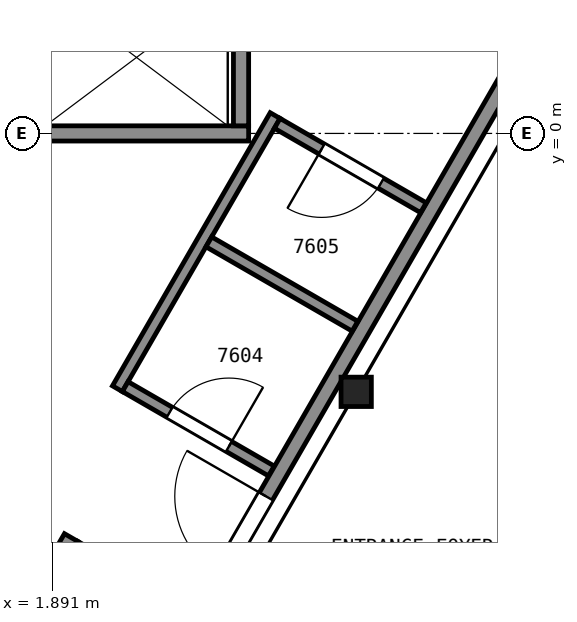
"""IFC4 building model, lengths in metres.
Left out: names, types, materials, properties, quantities, classifications, styles, units other than length and angle.
Written with IfcOpenShell. Run it as: python <this file> out.ifc"""

import sys

from ifc_helpers import new_model, si_unit, direction, frame, frame_2d, origin, origin_2d, place, context, subcontext, project, spatial, rectangle, i_section, extrude, element, fill, save


model = new_model("IFC4")
c1 = context("Model", 3, precision=1e-05, world=origin(), true_north=direction((0.0, 1.0)))
c2 = subcontext(c1, "Body", "Model", "MODEL_VIEW")
j1 = project(units=[si_unit("LENGTHUNIT", "METRE"), si_unit("PLANEANGLEUNIT", "RADIAN")], contexts=[c1])
p1 = place(None, origin())
s1 = spatial("IfcSite", under=j1, at=p1, CompositionType="ELEMENT")
p2 = place(p1, origin())
s2 = spatial("IfcBuilding", under=s1, at=p2, CompositionType="ELEMENT")
p3 = place(p2, frame((0.0, 0.0, 301.0)))
s3 = spatial("IfcBuildingStorey", under=s2, at=p3, CompositionType="ELEMENT", Elevation=301.0)
p4 = place(p3, frame((5.89, -3.4, 0.0), z_axis=(0.0, 0.0, 1.0), x_axis=(1.0, 0.0, 0.0)))
e1 = element("IfcColumn", 1, at=p4, inside=s3, PredefinedType="COLUMN", context=c2, shape_type="SweptSolid", body=[
    extrude(i_section(OverallWidth=0.399, OverallDepth=0.386, WebThickness=0.021, FlangeThickness=0.033, FilletRadius=0.015, at=origin_2d()), origin(), (0.0, 0.0, 1.0), 3.7),
])
p5 = place(p3, frame((1.525, 0.0, 0.0), z_axis=(0.0, 0.0, 1.0), x_axis=(1.0, 0.0, 0.0)))
e2 = element("IfcWall", 2, at=p5, inside=s3, PredefinedType="PARTITIONING", context=c2, shape_type="SweptSolid", body=[
    extrude(rectangle(XDim=2.95, YDim=0.2, at=frame_2d((1.475, 0.0))), origin(), (0.0, 0.0, 1.0), 3.7),
])
p6 = place(p3, frame((0.863, -7.525, 0.0), z_axis=(0.0, 0.0, 1.0), x_axis=(0.499990435942, 0.866030925526, 0.0)))
e3 = element("IfcWall", 3, at=p6, inside=s3, PredefinedType="PARTITIONING", context=c2, shape_type="SweptSolid", body=[
    extrude(rectangle(XDim=2.55, YDim=0.2, at=frame_2d((1.275, 0.0))), origin(), (0.0, 0.0, 1.0), 3.7),
])
p7 = place(p6, frame((0.725, 0.0, 0.0)))
e4 = element("IfcOpeningElement", 4, at=p7, cuts=e3, PredefinedType="OPENING", context=c2, shape_type="SweptSolid", body=[
    extrude(rectangle(XDim=1.1, YDim=2.1, at=frame_2d((0.55, 1.05))), frame((0.0, 0.11, 0.0), z_axis=(0.0, -1.0, 0.0), x_axis=(1.0, 0.0, 0.0)), (0.0, 0.0, 1.0), 0.22),
])
p8 = place(p3, frame((4.375, 0.1, 0.0), z_axis=(0.0, 0.0, 1.0), x_axis=(0.0, 1.0, 0.0)))
e5 = element("IfcWall", 5, at=p8, inside=s3, PredefinedType="PARTITIONING", context=c2, shape_type="SweptSolid", body=[
    extrude(rectangle(XDim=1.95, YDim=0.2, at=frame_2d((0.975, 0.0))), origin(), (0.0, 0.0, 1.0), 3.7),
])
p9 = place(p3, frame((3.69, -6.328, 0.0), z_axis=(0.0, 0.0, 1.0), x_axis=(-0.866036909293, 0.499980071345, 0.0)))
e6 = element("IfcWall", 6, at=p9, inside=s3, PredefinedType="PARTITIONING", context=c2, shape_type="SweptSolid", body=[
    extrude(rectangle(XDim=1.75, YDim=0.2, at=frame_2d((0.875, 0.0))), origin(), (0.0, 0.0, 1.0), 3.7),
])
p10 = place(p3, frame((2.749, -3.359, 0.0), z_axis=(0.0, 0.0, 1.0), x_axis=(0.500017827812, 0.866015110648, 0.0)))
e7 = element("IfcWall", 7, at=p10, inside=s3, PredefinedType="PARTITIONING", context=c2, shape_type="SweptSolid", body=[
    extrude(rectangle(XDim=4.15, YDim=0.15, at=frame_2d((2.075, 0.0))), origin(), (0.0, 0.0, 1.0), 3.45),
])
p11 = place(p3, frame((2.851, -3.332, 0.0), z_axis=(0.0, 0.0, 1.0), x_axis=(0.866110524189, -0.499852538144, 0.0)))
e8 = element("IfcWall", 8, at=p11, inside=s3, PredefinedType="PARTITIONING", context=c2, shape_type="SweptSolid", body=[
    extrude(rectangle(XDim=2.22, YDim=0.15, at=frame_2d((1.11, 0.0))), origin(), (0.0, 0.0, 1.0), 3.45),
])
p12 = place(p11, frame((0.675, 0.0, 0.0)))
e9 = element("IfcOpeningElement", 9, at=p12, cuts=e8, PredefinedType="OPENING", context=c2, shape_type="SweptSolid", body=[
    extrude(rectangle(XDim=0.9, YDim=2.1, at=frame_2d((0.45, 1.05))), frame((0.0, 0.085, 0.0), z_axis=(0.0, -1.0, 0.0), x_axis=(1.0, 0.0, 0.0)), (0.0, 0.0, 1.0), 0.17),
])
p13 = place(p3, frame((3.828, -6.29, 0.0), z_axis=(0.0, 0.0, 1.0), x_axis=(0.499979739078, 0.866037101117, 0.0)))
e10 = element("IfcWall", 10, at=p13, inside=s3, PredefinedType="PARTITIONING", context=c2, shape_type="SweptSolid", body=[
    extrude(rectangle(XDim=11.363, YDim=0.2, at=frame_2d((5.681, 0.0))), origin(), (0.0, 0.0, 1.0), 3.45),
])
p14 = place(p13, frame((0.55, 0.0, 0.0)))
e11 = element("IfcOpeningElement", 11, at=p14, cuts=e10, PredefinedType="OPENING", context=c2, shape_type="SweptSolid", body=[
    extrude(rectangle(XDim=1.2, YDim=2.1, at=frame_2d((0.6, 1.05))), frame((0.0, 0.11, 0.0), z_axis=(0.0, -1.0, 0.0), x_axis=(1.0, 0.0, 0.0)), (0.0, 0.0, 1.0), 0.22),
])
p15 = place(p3, frame((3.951, -1.427, 0.0), z_axis=(0.0, 0.0, 1.0), x_axis=(0.866062920605, -0.499935013329, 0.0)))
e12 = element("IfcWall", 12, at=p15, inside=s3, PredefinedType="PARTITIONING", context=c2, shape_type="SweptSolid", body=[
    extrude(rectangle(XDim=2.22, YDim=0.15, at=frame_2d((1.11, 0.0))), origin(), (0.0, 0.0, 1.0), 3.45),
])
p16 = place(p3, frame((6.774, -0.978, 0.0), z_axis=(0.0, 0.0, 1.0), x_axis=(-0.866062920605, 0.499935013329, 0.0)))
e13 = element("IfcWall", 13, at=p16, inside=s3, PredefinedType="PARTITIONING", context=c2, shape_type="SweptSolid", body=[
    extrude(rectangle(XDim=2.22, YDim=0.15, at=frame_2d((1.11, 0.0))), origin(), (0.0, 0.0, 1.0), 3.45),
])
p17 = place(p16, frame((0.646, 0.0, 0.0)))
e14 = element("IfcOpeningElement", 14, at=p17, cuts=e13, PredefinedType="OPENING", context=c2, shape_type="SweptSolid", body=[
    extrude(rectangle(XDim=0.9, YDim=2.1, at=frame_2d((0.45, 1.05))), frame((0.0, 0.085, 0.0), z_axis=(0.0, -1.0, 0.0), x_axis=(1.0, 0.0, 0.0)), (0.0, 0.0, 1.0), 0.17),
])
p18 = place(p3, frame((7.682, -8.47, 0.0), z_axis=(0.0, 0.0, 1.0), x_axis=(0.698777378461, 0.715339203002, 0.0)))
e15 = element("IfcWall", 15, at=p18, inside=s3, PredefinedType="PARTITIONING", context=c2, shape_type="SweptSolid", body=[
    extrude(rectangle(XDim=4.452, YDim=0.1, at=frame_2d((2.226, 0.0))), origin(), (0.0, 0.0, 1.0), 2.723),
])
p19 = place(p12, origin())
e16 = element("IfcDoor", 16, at=p19, inside=s3, OperationType="SINGLE_SWING_RIGHT", PredefinedType="DOOR", context=c2, shape_type="SweptSolid", body=[
    extrude(rectangle(XDim=0.9, YDim=2.1, at=frame_2d((0.45, 1.05))), frame((0.0, 0.025, 0.0), z_axis=(0.0, -1.0, 0.0), x_axis=(1.0, 0.0, 0.0)), (0.0, 0.0, 1.0), 0.05),
])
fill(e9, e16)
p20 = place(p14, origin())
e17 = element("IfcDoor", 17, at=p20, inside=s3, OperationType="SINGLE_SWING_RIGHT", PredefinedType="DOOR", context=c2, shape_type="SweptSolid", body=[
    extrude(rectangle(XDim=1.2, YDim=2.1, at=frame_2d((0.6, 1.05))), frame((0.0, 0.025, 0.0), z_axis=(0.0, -1.0, 0.0), x_axis=(1.0, 0.0, 0.0)), (0.0, 0.0, 1.0), 0.05),
])
fill(e11, e17)
p21 = place(p17, origin())
e18 = element("IfcDoor", 18, at=p21, inside=s3, OperationType="SINGLE_SWING_RIGHT", PredefinedType="DOOR", context=c2, shape_type="SweptSolid", body=[
    extrude(rectangle(XDim=0.9, YDim=2.1, at=frame_2d((0.45, 1.05))), frame((0.0, 0.025, 0.0), z_axis=(0.0, -1.0, 0.0), x_axis=(1.0, 0.0, 0.0)), (0.0, 0.0, 1.0), 0.05),
])
fill(e14, e18)
save(model, sys.argv[1])
